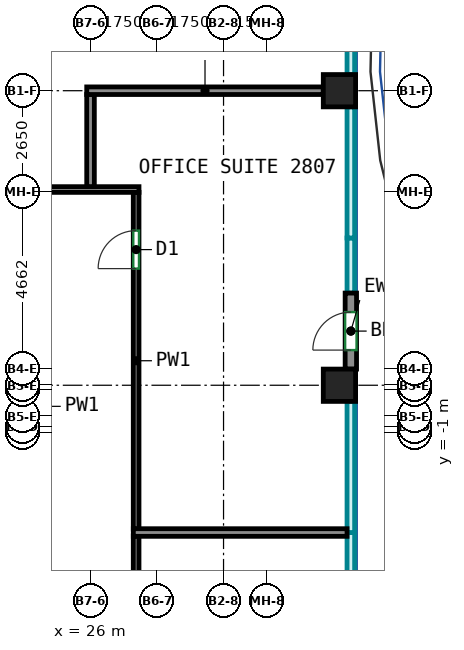
"""IFC4 building model, lengths in metres.
Left out: names, types, materials, properties, quantities, classifications, styles, units other than length and angle.
Written with IfcOpenShell. Run it as: python <this file> out.ifc"""

import sys

from ifc_helpers import new_model, si_unit, direction, frame, frame_2d, origin, origin_2d, place, context, subcontext, project, spatial, rectangle, extrude, source, transform, mapped, element, fill, save


model = new_model("IFC4")
c1 = context("Model", 3, precision=1e-05, world=origin(), true_north=direction((0.0, 1.0)))
c2 = subcontext(c1, "Body", "Model", "MODEL_VIEW")
j1 = project(units=[si_unit("LENGTHUNIT", "METRE"), si_unit("PLANEANGLEUNIT", "RADIAN")], contexts=[c1])
p1 = place(None, origin())
s1 = spatial("IfcSite", under=j1, at=p1, CompositionType="ELEMENT")
p2 = place(p1, origin())
s2 = spatial("IfcBuilding", under=s1, at=p2, CompositionType="ELEMENT")
p3 = place(p2, frame((0.0, 0.0, 120.6)))
s3 = spatial("IfcBuildingStorey", under=s2, at=p3, CompositionType="ELEMENT", Elevation=120.6)
m1 = source(origin(), c2, "Body", "SweptSolid", [
    extrude(rectangle(XDim=0.85, YDim=0.85, at=origin_2d()), origin(), (0.0, 0.0, 1.0), 3.72),
])
for number, where, z_axis, x_axis in (
    (1, (32.55, 0.25, 0.0), (0.0, 0.0, 1.0), (1.0, 0.0, 0.0)),
    (2, (32.55, 8.0, 0.0), (0.0, 0.0, 1.0), (1.0, 0.0, 0.0)),
):
    element("IfcColumn", number, at=place(p3, frame(where, z_axis=z_axis, x_axis=x_axis)), inside=s3, PredefinedType="COLUMN", context=c2, shape_type="MappedRepresentation", body=[
        mapped(m1, transform((0.0, 0.0, 0.0))),
    ])
m2 = source(origin(), c2, "Body", "SweptSolid", [
    extrude(rectangle(XDim=2.0, YDim=0.3, at=frame_2d((1.0, 0.0))), origin(), (0.0, 0.0, 1.0), 3.72),
])
p4 = place(p3, frame((32.85, 0.675, 0.0), z_axis=(0.0, 0.0, 1.0), x_axis=(0.0, 1.0, 0.0)))
e3 = element("IfcWall", 3, at=p4, inside=s3, PredefinedType="SOLIDWALL", context=c2, shape_type="MappedRepresentation", body=[
    mapped(m2, transform((0.0, 0.0, 0.0))),
])
p5 = place(p4, frame((0.5, 0.0, 0.0)))
e4 = element("IfcOpeningElement", 4, at=p5, cuts=e3, PredefinedType="OPENING", context=c2, shape_type="SweptSolid", body=[
    extrude(rectangle(XDim=1.0, YDim=2.1, at=frame_2d((0.5, 1.05))), frame((0.0, 0.16, 0.0), z_axis=(0.0, -1.0, 0.0), x_axis=(1.0, 0.0, 0.0)), (0.0, 0.0, 1.0), 0.32),
])
p6 = place(p3, frame((27.2, -19.175, 0.0), z_axis=(0.0, 0.0, 1.0), x_axis=(0.0, 1.0, 0.0)))
e5 = element("IfcWall", 5, at=p6, inside=s3, PredefinedType="PARTITIONING", context=c2, shape_type="SweptSolid", body=[
    extrude(rectangle(XDim=15.46, YDim=0.15, at=frame_2d((7.73, 0.0))), origin(), (0.0, 0.0, 1.0), 3.72),
])
p7 = place(p6, frame((3.514, 0.0, 0.0)))
e6 = element("IfcOpeningElement", 6, at=p7, cuts=e5, PredefinedType="OPENING", context=c2, shape_type="SweptSolid", body=[
    extrude(rectangle(XDim=1.0, YDim=2.1, at=frame_2d((0.5, 1.05))), frame((0.0, 0.085, 0.0), z_axis=(0.0, -1.0, 0.0), x_axis=(1.0, 0.0, 0.0)), (0.0, 0.0, 1.0), 0.17),
])
p8 = place(p3, frame((27.2, -3.535, 0.0), z_axis=(0.0, 0.0, 1.0), x_axis=(0.0, 1.0, 0.0)))
e7 = element("IfcWall", 7, at=p8, inside=s3, PredefinedType="PARTITIONING", context=c2, shape_type="SweptSolid", body=[
    extrude(rectangle(XDim=8.86, YDim=0.15, at=frame_2d((4.43, 0.0))), origin(), (0.0, 0.0, 1.0), 3.72),
])
p9 = place(p8, frame((6.854, 0.0, 0.0)))
e8 = element("IfcOpeningElement", 8, at=p9, cuts=e7, PredefinedType="OPENING", context=c2, shape_type="SweptSolid", body=[
    extrude(rectangle(XDim=1.0, YDim=2.1, at=frame_2d((0.5, 1.05))), frame((0.0, 0.085, 0.0), z_axis=(0.0, -1.0, 0.0), x_axis=(1.0, 0.0, 0.0)), (0.0, 0.0, 1.0), 0.17),
])
p10 = place(p3, frame((20.425, 5.4, 0.0), z_axis=(0.0, 0.0, 1.0), x_axis=(1.0, 0.0, 0.0)))
e9 = element("IfcWall", 9, at=p10, inside=s3, PredefinedType="PARTITIONING", context=c2, shape_type="SweptSolid", body=[
    extrude(rectangle(XDim=6.85, YDim=0.15, at=frame_2d((3.425, 0.0))), origin(), (0.0, 0.0, 1.0), 3.72),
])
p11 = place(p10, frame((2.752, 0.0, 0.0)))
e10 = element("IfcOpeningElement", 10, at=p11, cuts=e9, PredefinedType="OPENING", context=c2, shape_type="SweptSolid", body=[
    extrude(rectangle(XDim=1.0, YDim=2.1, at=frame_2d((0.5, 1.05))), frame((0.0, 0.085, 0.0), z_axis=(0.0, -1.0, 0.0), x_axis=(1.0, 0.0, 0.0)), (0.0, 0.0, 1.0), 0.17),
])
p12 = place(p3, frame((27.126, -3.625, 0.0), z_axis=(0.0, 0.0, 1.0), x_axis=(1.0, 0.0, 0.0)))
e11 = element("IfcWall", 11, at=p12, inside=s3, PredefinedType="PARTITIONING", context=c2, shape_type="SweptSolid", body=[
    extrude(rectangle(XDim=5.624, YDim=0.2, at=frame_2d((2.812, 0.0))), origin(), (0.0, 0.0, 1.0), 3.72),
])
p13 = place(p3, frame((26.0, 5.476, 0.0), z_axis=(0.0, 0.0, 1.0), x_axis=(0.0, 1.0, 0.0)))
e12 = element("IfcWall", 12, at=p13, inside=s3, PredefinedType="PARTITIONING", context=c2, shape_type="SweptSolid", body=[
    extrude(rectangle(XDim=2.424, YDim=0.2, at=frame_2d((1.212, 0.0))), origin(), (0.0, 0.0, 1.0), 3.72),
])
p14 = place(p3, frame((25.9, 8.0, 0.0), z_axis=(0.0, 0.0, 1.0), x_axis=(1.0, 0.0, 0.0)))
e13 = element("IfcWall", 13, at=p14, inside=s3, PredefinedType="PARTITIONING", context=c2, shape_type="SweptSolid", body=[
    extrude(rectangle(XDim=6.225, YDim=0.2, at=frame_2d((3.113, 0.0))), origin(), (0.0, 0.0, 1.0), 3.07),
])
p15 = place(p5, origin())
e14 = element("IfcDoor", 14, at=p15, inside=s3, OperationType="SINGLE_SWING_LEFT", PredefinedType="DOOR", context=c2, shape_type="SweptSolid", body=[
    extrude(rectangle(XDim=1.0, YDim=2.1, at=frame_2d((0.5, 1.05))), frame((0.0, 0.025, 0.0), z_axis=(0.0, -1.0, 0.0), x_axis=(1.0, 0.0, 0.0)), (0.0, 0.0, 1.0), 0.05),
])
fill(e4, e14)
p16 = place(p9, origin())
e15 = element("IfcDoor", 15, at=p16, inside=s3, OperationType="SINGLE_SWING_LEFT", PredefinedType="DOOR", context=c2, shape_type="SweptSolid", body=[
    extrude(rectangle(XDim=1.0, YDim=2.1, at=frame_2d((0.5, 1.05))), frame((0.0, 0.025, 0.0), z_axis=(0.0, -1.0, 0.0), x_axis=(1.0, 0.0, 0.0)), (0.0, 0.0, 1.0), 0.05),
])
fill(e8, e15)
save(model, sys.argv[1])
